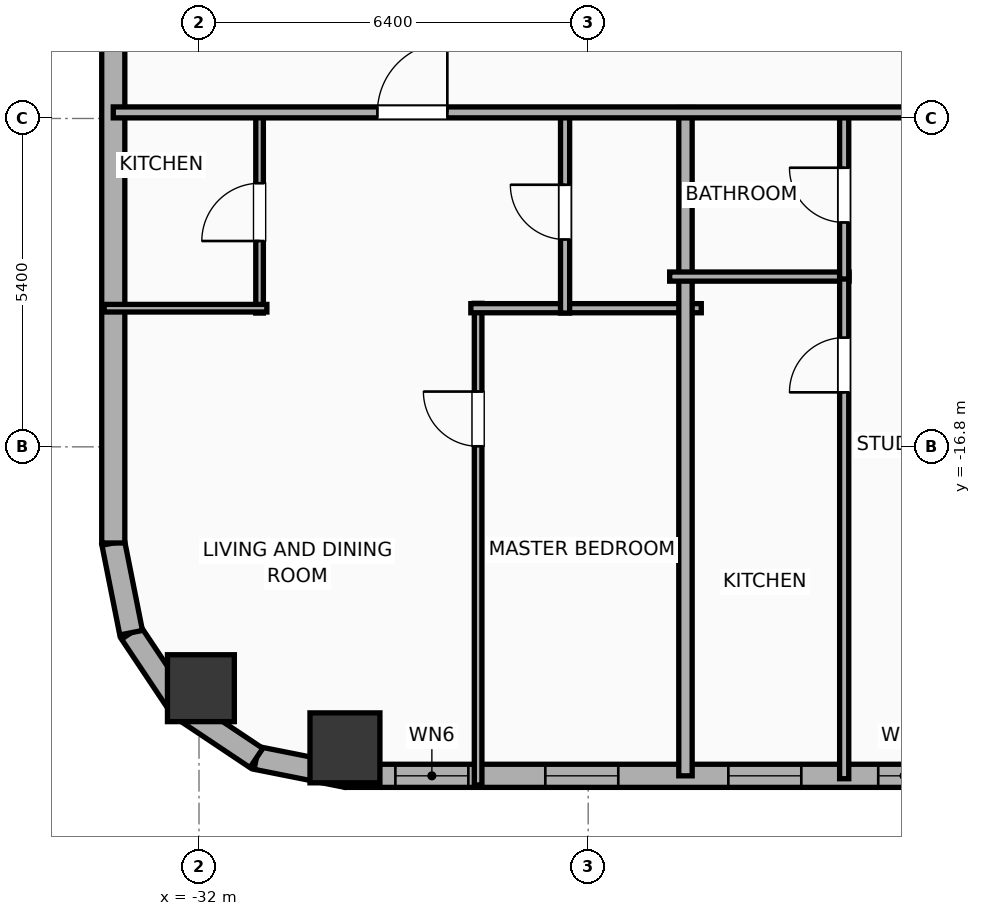
"""IFC4 building model, lengths in metres.
Left out: names, types, materials, properties, quantities, classifications, styles, units other than length and angle.
Written with IfcOpenShell. Run it as: python <this file> out.ifc"""

import sys

from ifc_helpers import new_model, si_unit, direction, frame, frame_2d, origin, origin_2d, place, context, subcontext, project, spatial, rectangle, hollow_rectangle, hollow_circle, extrude, element, fill, save


model = new_model("IFC4")
c1 = context("Model", 3, precision=1e-05, world=origin(), true_north=direction((0.0, 1.0)))
c2 = subcontext(c1, "Body", "Model", "MODEL_VIEW")
j1 = project(units=[si_unit("LENGTHUNIT", "METRE"), si_unit("PLANEANGLEUNIT", "RADIAN")], contexts=[c1])
p1 = place(None, origin())
s1 = spatial("IfcSite", under=j1, at=p1, CompositionType="ELEMENT")
p2 = place(p1, origin())
s2 = spatial("IfcBuilding", under=s1, at=p2, CompositionType="ELEMENT")
p3 = place(p2, frame((0.0, 0.0, 49.4)))
s3 = spatial("IfcBuildingStorey", under=s2, at=p3, CompositionType="ELEMENT", Elevation=49.4)
p4 = place(p3, frame((-29.6, -21.75, 0.0), z_axis=(0.0, 0.0, 1.0), x_axis=(1.0, 0.0, 0.0)))
e1 = element("IfcColumn", 1, at=p4, inside=s3, PredefinedType="COLUMN", context=c2, shape_type="SweptSolid", body=[
    extrude(hollow_rectangle(XDim=1.15, YDim=1.15, WallThickness=0.04, at=origin_2d()), origin(), (0.0, 0.0, 1.0), 3.9),
])
p5 = place(p3, frame((-31.969, -20.769, 0.0), z_axis=(0.0, 0.0, 1.0), x_axis=(1.0, 0.0, 0.0)))
e2 = element("IfcColumn", 2, at=p5, inside=s3, PredefinedType="COLUMN", context=c2, shape_type="SweptSolid", body=[
    extrude(hollow_circle(Radius=0.55, WallThickness=0.036, at=origin_2d()), origin(), (0.0, 0.0, 1.0), 3.9),
])
p6 = place(p3, frame((22.381, -22.21, 0.0), z_axis=(0.0, 0.0, 1.0), x_axis=(-1.0, 0.0, 0.0)))
e3 = element("IfcWall", 3, at=p6, inside=s3, PredefinedType="ELEMENTEDWALL", context=c2, shape_type="SweptSolid", body=[
    extrude(rectangle(XDim=51.963, YDim=0.38, at=frame_2d((25.981, 0.0))), origin(), (0.0, 0.0, 1.0), 3.65),
])
p7 = place(p6, frame((49.952, 0.0, 0.75)))
e4 = element("IfcOpeningElement", 4, at=p7, cuts=e3, PredefinedType="OPENING", context=c2, shape_type="SweptSolid", body=[
    extrude(rectangle(XDim=1.2, YDim=2.05, at=frame_2d((0.6, 1.025))), frame((0.0, 0.2, 0.0), z_axis=(0.0, -1.0, 0.0), x_axis=(1.0, 0.0, 0.0)), (0.0, 0.0, 1.0), 0.4),
])
p8 = place(p6, frame((47.486, 0.0, 0.75)))
e5 = element("IfcOpeningElement", 5, at=p8, cuts=e3, PredefinedType="OPENING", context=c2, shape_type="SweptSolid", body=[
    extrude(rectangle(XDim=1.2, YDim=2.05, at=frame_2d((0.6, 1.025))), frame((0.0, 0.2, 0.0), z_axis=(0.0, -1.0, 0.0), x_axis=(1.0, 0.0, 0.0)), (0.0, 0.0, 1.0), 0.4),
])
p9 = place(p6, frame((42.361, 0.0, 0.75)))
e6 = element("IfcOpeningElement", 6, at=p9, cuts=e3, PredefinedType="OPENING", context=c2, shape_type="SweptSolid", body=[
    extrude(rectangle(XDim=0.85, YDim=2.05, at=frame_2d((0.425, 1.025))), frame((0.0, 0.2, 0.0), z_axis=(0.0, -1.0, 0.0), x_axis=(1.0, 0.0, 0.0)), (0.0, 0.0, 1.0), 0.4),
])
p10 = place(p6, frame((44.476, 0.0, 0.75)))
e7 = element("IfcOpeningElement", 7, at=p10, cuts=e3, PredefinedType="OPENING", context=c2, shape_type="SweptSolid", body=[
    extrude(rectangle(XDim=1.2, YDim=2.05, at=frame_2d((0.6, 1.025))), frame((0.0, 0.2, 0.0), z_axis=(0.0, -1.0, 0.0), x_axis=(1.0, 0.0, 0.0)), (0.0, 0.0, 1.0), 0.4),
])
p11 = place(p6, frame((34.811, 0.0, 0.75)))
e8 = element("IfcOpeningElement", 8, at=p11, cuts=e3, PredefinedType="OPENING", context=c2, shape_type="SweptSolid", body=[
    extrude(rectangle(XDim=1.2, YDim=2.05, at=frame_2d((0.6, 1.025))), frame((0.0, 0.2, 0.0), z_axis=(0.0, -1.0, 0.0), x_axis=(1.0, 0.0, 0.0)), (0.0, 0.0, 1.0), 0.4),
])
p12 = place(p6, frame((38.061, 0.0, 0.75)))
e9 = element("IfcOpeningElement", 9, at=p12, cuts=e3, PredefinedType="OPENING", context=c2, shape_type="SweptSolid", body=[
    extrude(rectangle(XDim=1.2, YDim=2.05, at=frame_2d((0.6, 1.025))), frame((0.0, 0.2, 0.0), z_axis=(0.0, -1.0, 0.0), x_axis=(1.0, 0.0, 0.0)), (0.0, 0.0, 1.0), 0.4),
])
p13 = place(p6, frame((29.171, 0.0, 0.75)))
e10 = element("IfcOpeningElement", 10, at=p13, cuts=e3, PredefinedType="OPENING", context=c2, shape_type="SweptSolid", body=[
    extrude(rectangle(XDim=1.2, YDim=2.05, at=frame_2d((0.6, 1.025))), frame((0.0, 0.2, 0.0), z_axis=(0.0, -1.0, 0.0), x_axis=(1.0, 0.0, 0.0)), (0.0, 0.0, 1.0), 0.4),
])
p14 = place(p6, frame((21.757, 0.0, 0.75)))
e11 = element("IfcOpeningElement", 11, at=p14, cuts=e3, PredefinedType="OPENING", context=c2, shape_type="SweptSolid", body=[
    extrude(rectangle(XDim=1.2, YDim=2.05, at=frame_2d((0.6, 1.025))), frame((0.0, 0.2, 0.0), z_axis=(0.0, -1.0, 0.0), x_axis=(1.0, 0.0, 0.0)), (0.0, 0.0, 1.0), 0.4),
])
p15 = place(p6, frame((25.007, 0.0, 0.75)))
e12 = element("IfcOpeningElement", 12, at=p15, cuts=e3, PredefinedType="OPENING", context=c2, shape_type="SweptSolid", body=[
    extrude(rectangle(XDim=1.2, YDim=2.05, at=frame_2d((0.6, 1.025))), frame((0.0, 0.2, 0.0), z_axis=(0.0, -1.0, 0.0), x_axis=(1.0, 0.0, 0.0)), (0.0, 0.0, 1.0), 0.4),
])
p16 = place(p6, frame((17.697, 0.0, 0.75)))
e13 = element("IfcOpeningElement", 13, at=p16, cuts=e3, PredefinedType="OPENING", context=c2, shape_type="SweptSolid", body=[
    extrude(rectangle(XDim=1.2, YDim=2.05, at=frame_2d((0.6, 1.025))), frame((0.0, 0.2, 0.0), z_axis=(0.0, -1.0, 0.0), x_axis=(1.0, 0.0, 0.0)), (0.0, 0.0, 1.0), 0.4),
])
p17 = place(p6, frame((14.447, 0.0, 0.75)))
e14 = element("IfcOpeningElement", 14, at=p17, cuts=e3, PredefinedType="OPENING", context=c2, shape_type="SweptSolid", body=[
    extrude(rectangle(XDim=1.2, YDim=2.05, at=frame_2d((0.6, 1.025))), frame((0.0, 0.2, 0.0), z_axis=(0.0, -1.0, 0.0), x_axis=(1.0, 0.0, 0.0)), (0.0, 0.0, 1.0), 0.4),
])
p18 = place(p6, frame((11.231, 0.0, 0.75)))
e15 = element("IfcOpeningElement", 15, at=p18, cuts=e3, PredefinedType="OPENING", context=c2, shape_type="SweptSolid", body=[
    extrude(rectangle(XDim=1.2, YDim=2.05, at=frame_2d((0.6, 1.025))), frame((0.0, 0.2, 0.0), z_axis=(0.0, -1.0, 0.0), x_axis=(1.0, 0.0, 0.0)), (0.0, 0.0, 1.0), 0.4),
])
p19 = place(p6, frame((5.082, 0.0, 0.75)))
e16 = element("IfcOpeningElement", 16, at=p19, cuts=e3, PredefinedType="OPENING", context=c2, shape_type="SweptSolid", body=[
    extrude(rectangle(XDim=1.2, YDim=2.05, at=frame_2d((0.6, 1.025))), frame((0.0, 0.2, 0.0), z_axis=(0.0, -1.0, 0.0), x_axis=(1.0, 0.0, 0.0)), (0.0, 0.0, 1.0), 0.4),
])
p20 = place(p6, frame((2.277, 0.0, 0.75)))
e17 = element("IfcOpeningElement", 17, at=p20, cuts=e3, PredefinedType="OPENING", context=c2, shape_type="SweptSolid", body=[
    extrude(rectangle(XDim=1.2, YDim=2.05, at=frame_2d((0.6, 1.025))), frame((0.0, 0.2, 0.0), z_axis=(0.0, -1.0, 0.0), x_axis=(1.0, 0.0, 0.0)), (0.0, 0.0, 1.0), 0.4),
])
p21 = place(p6, frame((1.071, 0.0, 0.75)))
e18 = element("IfcOpeningElement", 18, at=p21, cuts=e3, PredefinedType="OPENING", context=c2, shape_type="SweptSolid", body=[
    extrude(rectangle(XDim=0.52, YDim=2.05, at=frame_2d((0.26, 1.025))), frame((0.0, 0.2, 0.0), z_axis=(0.0, -1.0, 0.0), x_axis=(1.0, 0.0, 0.0)), (0.0, 0.0, 1.0), 0.4),
])
p22 = place(p3, frame((-29.581, -22.21, 0.0), z_axis=(0.0, 0.0, 1.0), x_axis=(-0.980786132421, 0.195086038585, 0.0)))
e19 = element("IfcWall", 19, at=p22, inside=s3, PredefinedType="ELEMENTEDWALL", context=c2, shape_type="SweptSolid", body=[
    extrude(rectangle(XDim=1.504, YDim=0.38, at=frame_2d((0.752, 0.0))), origin(), (0.0, 0.0, 1.0), 3.65),
])
p23 = place(p3, frame((-31.057, -21.917, 0.0), z_axis=(0.0, 0.0, 1.0), x_axis=(-0.831442848281, 0.555610286119, 0.0)))
e20 = element("IfcWall", 20, at=p23, inside=s3, PredefinedType="ELEMENTEDWALL", context=c2, shape_type="SweptSolid", body=[
    extrude(rectangle(XDim=1.485, YDim=0.38, at=frame_2d((0.743, 0.0))), origin(), (0.0, 0.0, 1.0), 3.65),
])
p24 = place(p3, frame((-32.292, -21.091, 0.0), z_axis=(0.0, 0.0, 1.0), x_axis=(-0.555572577804, 0.831468045563, 0.0)))
e21 = element("IfcWall", 21, at=p24, inside=s3, PredefinedType="ELEMENTEDWALL", context=c2, shape_type="SweptSolid", body=[
    extrude(rectangle(XDim=1.485, YDim=0.38, at=frame_2d((0.742, 0.0))), origin(), (0.0, 0.0, 1.0), 3.65),
])
p25 = place(p3, frame((-33.116, -19.857, 0.0), z_axis=(0.0, 0.0, 1.0), x_axis=(-0.195086038585, 0.980786132421, 0.0)))
e22 = element("IfcWall", 22, at=p25, inside=s3, PredefinedType="ELEMENTEDWALL", context=c2, shape_type="SweptSolid", body=[
    extrude(rectangle(XDim=1.504, YDim=0.38, at=frame_2d((0.752, 0.0))), origin(), (0.0, 0.0, 1.0), 3.65),
])
p26 = place(p3, frame((-33.41, -18.381, 0.0), z_axis=(0.0, 0.0, 1.0), x_axis=(0.0, 1.0, 0.0)))
e23 = element("IfcWall", 23, at=p26, inside=s3, PredefinedType="ELEMENTEDWALL", context=c2, shape_type="SweptSolid", body=[
    extrude(rectangle(XDim=36.763, YDim=0.38, at=frame_2d((18.381, 0.0))), origin(), (0.0, 0.0, 1.0), 3.65),
])
p27 = place(p26, frame((33.787, 0.0, 0.75)))
e24 = element("IfcOpeningElement", 24, at=p27, cuts=e23, PredefinedType="OPENING", context=c2, shape_type="SweptSolid", body=[
    extrude(rectangle(XDim=1.2, YDim=2.05, at=frame_2d((0.6, 1.025))), frame((0.0, 0.2, 0.0), z_axis=(0.0, -1.0, 0.0), x_axis=(1.0, 0.0, 0.0)), (0.0, 0.0, 1.0), 0.4),
])
p28 = place(p26, frame((22.726, 0.0, 0.75)))
e25 = element("IfcOpeningElement", 25, at=p28, cuts=e23, PredefinedType="OPENING", context=c2, shape_type="SweptSolid", body=[
    extrude(rectangle(XDim=1.2, YDim=2.05, at=frame_2d((0.6, 1.025))), frame((0.0, 0.2, 0.0), z_axis=(0.0, -1.0, 0.0), x_axis=(1.0, 0.0, 0.0)), (0.0, 0.0, 1.0), 0.4),
])
p29 = place(p26, frame((12.976, 0.0, 0.75)))
e26 = element("IfcOpeningElement", 26, at=p29, cuts=e23, PredefinedType="OPENING", context=c2, shape_type="SweptSolid", body=[
    extrude(rectangle(XDim=1.2, YDim=2.05, at=frame_2d((0.6, 1.025))), frame((0.0, 0.2, 0.0), z_axis=(0.0, -1.0, 0.0), x_axis=(1.0, 0.0, 0.0)), (0.0, 0.0, 1.0), 0.4),
])
p30 = place(p3, frame((-27.41, -22.36, 0.0), z_axis=(0.0, 0.0, 1.0), x_axis=(0.0, 1.0, 0.0)))
e27 = element("IfcWall", 27, at=p30, inside=s3, PredefinedType="PARTITIONING", context=c2, shape_type="SweptSolid", body=[
    extrude(rectangle(XDim=7.92, YDim=0.125, at=frame_2d((3.96, 0.0))), origin(), (0.0, 0.0, 1.0), 3.65),
])
p31 = place(p30, frame((5.569, 0.0, 0.0)))
e28 = element("IfcOpeningElement", 28, at=p31, cuts=e27, PredefinedType="OPENING", context=c2, shape_type="SweptSolid", body=[
    extrude(rectangle(XDim=0.9, YDim=2.05, at=frame_2d((0.45, 1.025))), frame((0.0, 0.073, 0.0), z_axis=(0.0, -1.0, 0.0), x_axis=(1.0, 0.0, 0.0)), (0.0, 0.0, 1.0), 0.145),
])
p32 = place(p3, frame((-27.53, -14.52, 0.0), z_axis=(0.0, 0.0, 1.0), x_axis=(1.0, 0.0, 0.0)))
e29 = element("IfcWall", 29, at=p32, inside=s3, PredefinedType="PLUMBINGWALL", context=c2, shape_type="SweptSolid", body=[
    extrude(rectangle(XDim=3.79, YDim=0.15, at=frame_2d((1.895, 0.0))), origin(), (0.0, 0.0, 1.0), 3.65),
])
p33 = place(p3, frame((-31.004, -14.6, 0.0), z_axis=(0.0, 0.0, 1.0), x_axis=(0.0, 1.0, 0.0)))
e30 = element("IfcWall", 30, at=p33, inside=s3, PredefinedType="PARTITIONING", context=c2, shape_type="SweptSolid", body=[
    extrude(rectangle(XDim=3.32, YDim=0.125, at=frame_2d((1.66, 0.0))), origin(), (0.0, 0.0, 1.0), 2.94),
])
p34 = place(p33, frame((1.185, 0.0, 0.0)))
e31 = element("IfcOpeningElement", 31, at=p34, cuts=e30, PredefinedType="OPENING", context=c2, shape_type="SweptSolid", body=[
    extrude(rectangle(XDim=0.95, YDim=2.05, at=frame_2d((0.475, 1.025))), frame((0.0, 0.073, 0.0), z_axis=(0.0, -1.0, 0.0), x_axis=(1.0, 0.0, 0.0)), (0.0, 0.0, 1.0), 0.145),
])
p35 = place(p3, frame((-33.56, -14.52, 0.0), z_axis=(0.0, 0.0, 1.0), x_axis=(1.0, 0.0, 0.0)))
e32 = element("IfcWall", 32, at=p35, inside=s3, PredefinedType="PARTITIONING", context=c2, shape_type="SweptSolid", body=[
    extrude(rectangle(XDim=2.676, YDim=0.125, at=frame_2d((1.338, 0.0))), origin(), (0.0, 0.0, 1.0), 3.65),
])
p36 = place(p3, frame((-25.98, -14.6, 0.0), z_axis=(0.0, 0.0, 1.0), x_axis=(0.0, 1.0, 0.0)))
e33 = element("IfcWall", 33, at=p36, inside=s3, PredefinedType="PLUMBINGWALL", context=c2, shape_type="SweptSolid", body=[
    extrude(rectangle(XDim=3.32, YDim=0.15, at=frame_2d((1.66, 0.0))), origin(), (0.0, 0.0, 1.0), 3.65),
])
p37 = place(p36, frame((1.21, 0.0, 0.0)))
e34 = element("IfcOpeningElement", 34, at=p37, cuts=e33, PredefinedType="OPENING", context=c2, shape_type="SweptSolid", body=[
    extrude(rectangle(XDim=0.9, YDim=2.05, at=frame_2d((0.45, 1.025))), frame((0.0, 0.085, 0.0), z_axis=(0.0, -1.0, 0.0), x_axis=(1.0, 0.0, 0.0)), (0.0, 0.0, 1.0), 0.17),
])
p38 = place(p3, frame((-24.0, -22.21, 0.0), z_axis=(0.0, 0.0, 1.0), x_axis=(0.0, 1.0, 0.0)))
e35 = element("IfcWall", 35, at=p38, inside=s3, PredefinedType="PARTITIONING", context=c2, shape_type="SweptSolid", body=[
    extrude(rectangle(XDim=10.99, YDim=0.22, at=frame_2d((5.495, 0.0))), origin(), (0.0, 0.0, 1.0), 3.65),
])
p39 = place(p3, frame((-24.26, -14.0, 0.0), z_axis=(0.0, 0.0, 1.0), x_axis=(1.0, 0.0, 0.0)))
e36 = element("IfcWall", 36, at=p39, inside=s3, PredefinedType="PLUMBINGWALL", context=c2, shape_type="SweptSolid", body=[
    extrude(rectangle(XDim=2.95, YDim=0.15, at=frame_2d((1.475, 0.0))), origin(), (0.0, 0.0, 1.0), 3.65),
])
p40 = place(p3, frame((-21.39, -22.258, 0.0), z_axis=(0.0, 0.0, 1.0), x_axis=(0.0, 1.0, 0.0)))
e37 = element("IfcWall", 37, at=p40, inside=s3, PredefinedType="PLUMBINGWALL", context=c2, shape_type="SweptSolid", body=[
    extrude(rectangle(XDim=8.298, YDim=0.15, at=frame_2d((4.149, 0.0))), origin(), (0.0, 0.0, 1.0), 3.65),
])
p41 = place(p40, frame((6.354, 0.0, 0.0)))
e38 = element("IfcOpeningElement", 38, at=p41, cuts=e37, PredefinedType="OPENING", context=c2, shape_type="SweptSolid", body=[
    extrude(rectangle(XDim=0.9, YDim=2.05, at=frame_2d((0.45, 1.025))), frame((0.0, 0.085, 0.0), z_axis=(0.0, -1.0, 0.0), x_axis=(1.0, 0.0, 0.0)), (0.0, 0.0, 1.0), 0.17),
])
p42 = place(p3, frame((-21.39, -14.04, 0.0), z_axis=(0.0, 0.0, 1.0), x_axis=(0.0, 1.0, 0.0)))
e39 = element("IfcWall", 39, at=p42, inside=s3, PredefinedType="PLUMBINGWALL", context=c2, shape_type="SweptSolid", body=[
    extrude(rectangle(XDim=2.76, YDim=0.15, at=frame_2d((1.38, 0.0))), origin(), (0.0, 0.0, 1.0), 3.65),
])
p43 = place(p42, frame((0.93, 0.0, 0.0)))
e40 = element("IfcOpeningElement", 40, at=p43, cuts=e39, PredefinedType="OPENING", context=c2, shape_type="SweptSolid", body=[
    extrude(rectangle(XDim=0.9, YDim=2.05, at=frame_2d((0.45, 1.025))), frame((0.0, 0.085, 0.0), z_axis=(0.0, -1.0, 0.0), x_axis=(1.0, 0.0, 0.0)), (0.0, 0.0, 1.0), 0.17),
])
p44 = place(p3, frame((-33.41, -11.3, 0.0), z_axis=(0.0, 0.0, 1.0), x_axis=(1.0, 0.0, 0.0)))
e41 = element("IfcWall", 41, at=p44, inside=s3, PredefinedType="PARTITIONING", context=c2, shape_type="SweptSolid", body=[
    extrude(rectangle(XDim=59.62, YDim=0.18, at=frame_2d((29.81, 0.0))), origin(), (0.0, 0.0, 1.0), 3.65),
])
p45 = place(p44, frame((4.344, 0.0, 0.0)))
e42 = element("IfcOpeningElement", 42, at=p45, cuts=e41, PredefinedType="OPENING", context=c2, shape_type="SweptSolid", body=[
    extrude(rectangle(XDim=1.15, YDim=2.05, at=frame_2d((0.575, 1.025))), frame((0.0, 0.1, 0.0), z_axis=(0.0, -1.0, 0.0), x_axis=(1.0, 0.0, 0.0)), (0.0, 0.0, 1.0), 0.2),
])
p46 = place(p44, frame((13.358, 0.0, 0.0)))
e43 = element("IfcOpeningElement", 43, at=p46, cuts=e41, PredefinedType="OPENING", context=c2, shape_type="SweptSolid", body=[
    extrude(rectangle(XDim=1.15, YDim=2.05, at=frame_2d((0.575, 1.025))), frame((0.0, 0.1, 0.0), z_axis=(0.0, -1.0, 0.0), x_axis=(1.0, 0.0, 0.0)), (0.0, 0.0, 1.0), 0.2),
])
p47 = place(p44, frame((19.773, 0.0, 0.0)))
e44 = element("IfcOpeningElement", 44, at=p47, cuts=e41, PredefinedType="OPENING", context=c2, shape_type="SweptSolid", body=[
    extrude(rectangle(XDim=1.15, YDim=2.05, at=frame_2d((0.575, 1.025))), frame((0.0, 0.1, 0.0), z_axis=(0.0, -1.0, 0.0), x_axis=(1.0, 0.0, 0.0)), (0.0, 0.0, 1.0), 0.2),
])
p48 = place(p44, frame((25.336, 0.0, 0.0)))
e45 = element("IfcOpeningElement", 45, at=p48, cuts=e41, PredefinedType="OPENING", context=c2, shape_type="SweptSolid", body=[
    extrude(rectangle(XDim=0.9, YDim=2.05, at=frame_2d((0.45, 1.025))), frame((0.0, 0.1, 0.0), z_axis=(0.0, -1.0, 0.0), x_axis=(1.0, 0.0, 0.0)), (0.0, 0.0, 1.0), 0.2),
])
p49 = place(p44, frame((32.83, 0.0, 0.0)))
e46 = element("IfcOpeningElement", 46, at=p49, cuts=e41, PredefinedType="OPENING", context=c2, shape_type="SweptSolid", body=[
    extrude(rectangle(XDim=1.15, YDim=2.05, at=frame_2d((0.575, 1.025))), frame((0.0, 0.1, 0.0), z_axis=(0.0, -1.0, 0.0), x_axis=(1.0, 0.0, 0.0)), (0.0, 0.0, 1.0), 0.2),
])
p50 = place(p44, frame((36.95, 0.0, 0.0)))
e47 = element("IfcOpeningElement", 47, at=p50, cuts=e41, PredefinedType="OPENING", context=c2, shape_type="SweptSolid", body=[
    extrude(rectangle(XDim=1.15, YDim=2.05, at=frame_2d((0.575, 1.025))), frame((0.0, 0.1, 0.0), z_axis=(0.0, -1.0, 0.0), x_axis=(1.0, 0.0, 0.0)), (0.0, 0.0, 1.0), 0.2),
])
p51 = place(p44, frame((44.837, 0.0, 0.0)))
e48 = element("IfcOpeningElement", 48, at=p51, cuts=e41, PredefinedType="OPENING", context=c2, shape_type="SweptSolid", body=[
    extrude(rectangle(XDim=0.9, YDim=2.05, at=frame_2d((0.45, 1.025))), frame((0.0, 0.1, 0.0), z_axis=(0.0, -1.0, 0.0), x_axis=(1.0, 0.0, 0.0)), (0.0, 0.0, 1.0), 0.2),
])
p52 = place(p44, frame((49.565, 0.0, 0.0)))
e49 = element("IfcOpeningElement", 49, at=p52, cuts=e41, PredefinedType="OPENING", context=c2, shape_type="SweptSolid", body=[
    extrude(rectangle(XDim=1.15, YDim=2.05, at=frame_2d((0.575, 1.025))), frame((0.0, 0.1, 0.0), z_axis=(0.0, -1.0, 0.0), x_axis=(1.0, 0.0, 0.0)), (0.0, 0.0, 1.0), 0.2),
])
p53 = place(p44, frame((56.583, 0.0, 0.0)))
e50 = element("IfcOpeningElement", 50, at=p53, cuts=e41, PredefinedType="OPENING", context=c2, shape_type="SweptSolid", body=[
    extrude(rectangle(XDim=0.9, YDim=2.05, at=frame_2d((0.45, 1.025))), frame((0.0, 0.1, 0.0), z_axis=(0.0, -1.0, 0.0), x_axis=(1.0, 0.0, 0.0)), (0.0, 0.0, 1.0), 0.2),
])
p54 = place(p7, origin())
e51 = element("IfcWindow", 51, at=p54, inside=s3, PartitioningType="SINGLE_PANEL", PredefinedType="WINDOW", context=c2, shape_type="SweptSolid", body=[
    extrude(rectangle(XDim=1.2, YDim=2.05, at=frame_2d((0.6, 1.025))), frame((0.0, 0.03, 0.0), z_axis=(0.0, -1.0, 0.0), x_axis=(1.0, 0.0, 0.0)), (0.0, 0.0, 1.0), 0.06),
])
fill(e4, e51)
p55 = place(p8, origin())
e52 = element("IfcWindow", 52, at=p55, inside=s3, PartitioningType="SINGLE_PANEL", PredefinedType="WINDOW", context=c2, shape_type="SweptSolid", body=[
    extrude(rectangle(XDim=1.2, YDim=2.05, at=frame_2d((0.6, 1.025))), frame((0.0, 0.03, 0.0), z_axis=(0.0, -1.0, 0.0), x_axis=(1.0, 0.0, 0.0)), (0.0, 0.0, 1.0), 0.06),
])
fill(e5, e52)
p56 = place(p9, origin())
e53 = element("IfcWindow", 53, at=p56, inside=s3, PartitioningType="SINGLE_PANEL", PredefinedType="WINDOW", context=c2, shape_type="SweptSolid", body=[
    extrude(rectangle(XDim=0.85, YDim=2.05, at=frame_2d((0.425, 1.025))), frame((0.0, 0.03, 0.0), z_axis=(0.0, -1.0, 0.0), x_axis=(1.0, 0.0, 0.0)), (0.0, 0.0, 1.0), 0.06),
])
fill(e6, e53)
p57 = place(p10, origin())
e54 = element("IfcWindow", 54, at=p57, inside=s3, PartitioningType="SINGLE_PANEL", PredefinedType="WINDOW", context=c2, shape_type="SweptSolid", body=[
    extrude(rectangle(XDim=1.2, YDim=2.05, at=frame_2d((0.6, 1.025))), frame((0.0, 0.03, 0.0), z_axis=(0.0, -1.0, 0.0), x_axis=(1.0, 0.0, 0.0)), (0.0, 0.0, 1.0), 0.06),
])
fill(e7, e54)
p58 = place(p31, origin())
e55 = element("IfcDoor", 55, at=p58, inside=s3, OperationType="SINGLE_SWING_RIGHT", PredefinedType="DOOR", context=c2, shape_type="SweptSolid", body=[
    extrude(rectangle(XDim=0.9, YDim=2.05, at=frame_2d((0.45, 1.025))), frame((0.0, 0.025, 0.0), z_axis=(0.0, -1.0, 0.0), x_axis=(1.0, 0.0, 0.0)), (0.0, 0.0, 1.0), 0.05),
])
fill(e28, e55)
p59 = place(p34, origin())
e56 = element("IfcDoor", 56, at=p59, inside=s3, OperationType="SINGLE_SWING_LEFT", PredefinedType="DOOR", context=c2, shape_type="SweptSolid", body=[
    extrude(rectangle(XDim=0.95, YDim=2.05, at=frame_2d((0.475, 1.025))), frame((0.0, 0.025, 0.0), z_axis=(0.0, -1.0, 0.0), x_axis=(1.0, 0.0, 0.0)), (0.0, 0.0, 1.0), 0.05),
])
fill(e31, e56)
p60 = place(p37, origin())
e57 = element("IfcDoor", 57, at=p60, inside=s3, OperationType="SINGLE_SWING_RIGHT", PredefinedType="DOOR", context=c2, shape_type="SweptSolid", body=[
    extrude(rectangle(XDim=0.9, YDim=2.05, at=frame_2d((0.45, 1.025))), frame((0.0, 0.025, 0.0), z_axis=(0.0, -1.0, 0.0), x_axis=(1.0, 0.0, 0.0)), (0.0, 0.0, 1.0), 0.05),
])
fill(e34, e57)
p61 = place(p41, origin())
e58 = element("IfcDoor", 58, at=p61, inside=s3, OperationType="SINGLE_SWING_LEFT", PredefinedType="DOOR", context=c2, shape_type="SweptSolid", body=[
    extrude(rectangle(XDim=0.9, YDim=2.05, at=frame_2d((0.45, 1.025))), frame((0.0, 0.025, 0.0), z_axis=(0.0, -1.0, 0.0), x_axis=(1.0, 0.0, 0.0)), (0.0, 0.0, 1.0), 0.05),
])
fill(e38, e58)
p62 = place(p43, origin())
e59 = element("IfcDoor", 59, at=p62, inside=s3, OperationType="SINGLE_SWING_RIGHT", PredefinedType="DOOR", context=c2, shape_type="SweptSolid", body=[
    extrude(rectangle(XDim=0.9, YDim=2.05, at=frame_2d((0.45, 1.025))), frame((0.0, 0.025, 0.0), z_axis=(0.0, -1.0, 0.0), x_axis=(1.0, 0.0, 0.0)), (0.0, 0.0, 1.0), 0.05),
])
fill(e40, e59)
p63 = place(p45, origin())
e60 = element("IfcDoor", 60, at=p63, inside=s3, OperationType="SINGLE_SWING_RIGHT", PredefinedType="DOOR", context=c2, shape_type="SweptSolid", body=[
    extrude(rectangle(XDim=1.15, YDim=2.05, at=frame_2d((0.575, 1.025))), frame((0.0, 0.025, 0.0), z_axis=(0.0, -1.0, 0.0), x_axis=(1.0, 0.0, 0.0)), (0.0, 0.0, 1.0), 0.05),
])
fill(e42, e60)
save(model, sys.argv[1])
